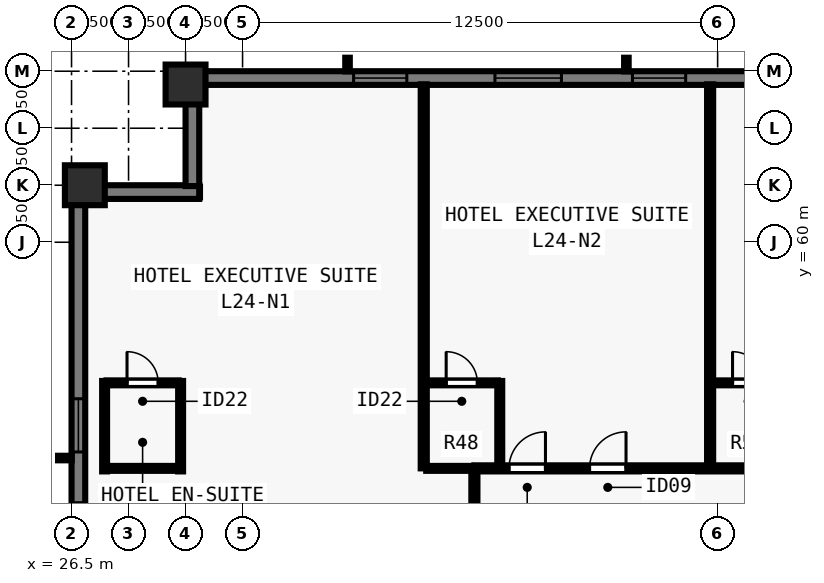
"""IFC4 building model, lengths in metres.
Left out: names, types, materials, properties, quantities, classifications, styles, units other than length and angle.
Written with IfcOpenShell. Run it as: python <this file> out.ifc"""

import sys

from ifc_helpers import new_model, si_unit, direction, frame, frame_2d, origin, origin_2d, place, context, subcontext, project, spatial, rectangle, extrude, element, fill, save


model = new_model("IFC4")
c1 = context("Model", 3, precision=1e-05, world=origin(), true_north=direction((0.0, 1.0)))
c2 = subcontext(c1, "Body", "Model", "MODEL_VIEW")
j1 = project(units=[si_unit("LENGTHUNIT", "METRE"), si_unit("PLANEANGLEUNIT", "RADIAN")], contexts=[c1])
p1 = place(None, origin())
s1 = spatial("IfcSite", under=j1, at=p1, CompositionType="ELEMENT")
p2 = place(p1, origin())
s2 = spatial("IfcBuilding", under=s1, at=p2, CompositionType="ELEMENT")
p3 = place(p2, frame((0.0, 0.0, 90.0)))
s3 = spatial("IfcBuildingStorey", under=s2, at=p3, CompositionType="ELEMENT", Elevation=90.0)
for number, where, z_axis, x_axis in (
    (1, (29.5, 64.15, 0.0), (0.0, 0.0, 1.0), (1.0, 0.0, 0.0)),
    (2, (26.85, 61.5, 0.0), (0.0, 0.0, 1.0), (0.0, 1.0, 0.0)),
):
    element("IfcColumn", number, at=place(p3, frame(where, z_axis=z_axis, x_axis=x_axis)), inside=s3, PredefinedType="COLUMN", context=c2, shape_type="SweptSolid", body=[
        extrude(rectangle(XDim=1.05, YDim=1.05, at=origin_2d()), origin(), (0.0, 0.0, 1.0), 3.5),
    ])
p4 = place(p3, frame((26.68, 16.5, 0.0), z_axis=(0.0, 0.0, 1.0), x_axis=(0.0, 1.0, 0.0)))
e3 = element("IfcWall", 3, at=p4, inside=s3, PredefinedType="SOLIDWALL", context=c2, shape_type="SweptSolid", body=[
    extrude(rectangle(XDim=44.662, YDim=0.36, at=frame_2d((22.331, 0.0))), origin(), (0.0, 0.0, 1.0), 3.28),
])
p5 = place(p4, frame((5.68, 0.0, 0.8)))
e4 = element("IfcOpeningElement", 4, at=p5, cuts=e3, PredefinedType="OPENING", context=c2, shape_type="SweptSolid", body=[
    extrude(rectangle(XDim=1.4, YDim=1.544, at=frame_2d((0.7, 0.772))), frame((0.0, 0.19, 0.0), z_axis=(0.0, -1.0, 0.0), x_axis=(1.0, 0.0, 0.0)), (0.0, 0.0, 1.0), 0.38),
])
p6 = place(p4, frame((8.015, 0.0, 0.8)))
e5 = element("IfcOpeningElement", 5, at=p6, cuts=e3, PredefinedType="OPENING", context=c2, shape_type="SweptSolid", body=[
    extrude(rectangle(XDim=1.75, YDim=1.544, at=frame_2d((0.875, 0.772))), frame((0.0, 0.19, 0.0), z_axis=(0.0, -1.0, 0.0), x_axis=(1.0, 0.0, 0.0)), (0.0, 0.0, 1.0), 0.38),
])
p7 = place(p4, frame((11.551, 0.0, 0.8)))
e6 = element("IfcOpeningElement", 6, at=p7, cuts=e3, PredefinedType="OPENING", context=c2, shape_type="SweptSolid", body=[
    extrude(rectangle(XDim=1.4, YDim=1.544, at=frame_2d((0.7, 0.772))), frame((0.0, 0.19, 0.0), z_axis=(0.0, -1.0, 0.0), x_axis=(1.0, 0.0, 0.0)), (0.0, 0.0, 1.0), 0.38),
])
p8 = place(p4, frame((14.736, 0.0, 0.8)))
e7 = element("IfcOpeningElement", 7, at=p8, cuts=e3, PredefinedType="OPENING", context=c2, shape_type="SweptSolid", body=[
    extrude(rectangle(XDim=1.75, YDim=1.544, at=frame_2d((0.875, 0.772))), frame((0.0, 0.19, 0.0), z_axis=(0.0, -1.0, 0.0), x_axis=(1.0, 0.0, 0.0)), (0.0, 0.0, 1.0), 0.38),
])
p9 = place(p4, frame((18.721, 0.0, 0.8)))
e8 = element("IfcOpeningElement", 8, at=p9, cuts=e3, PredefinedType="OPENING", context=c2, shape_type="SweptSolid", body=[
    extrude(rectangle(XDim=1.4, YDim=1.544, at=frame_2d((0.7, 0.772))), frame((0.0, 0.19, 0.0), z_axis=(0.0, -1.0, 0.0), x_axis=(1.0, 0.0, 0.0)), (0.0, 0.0, 1.0), 0.38),
])
p10 = place(p4, frame((22.706, 0.0, 0.8)))
e9 = element("IfcOpeningElement", 9, at=p10, cuts=e3, PredefinedType="OPENING", context=c2, shape_type="SweptSolid", body=[
    extrude(rectangle(XDim=1.75, YDim=1.544, at=frame_2d((0.875, 0.772))), frame((0.0, 0.19, 0.0), z_axis=(0.0, -1.0, 0.0), x_axis=(1.0, 0.0, 0.0)), (0.0, 0.0, 1.0), 0.38),
])
p11 = place(p4, frame((24.991, 0.0, 0.8)))
e10 = element("IfcOpeningElement", 10, at=p11, cuts=e3, PredefinedType="OPENING", context=c2, shape_type="SweptSolid", body=[
    extrude(rectangle(XDim=1.4, YDim=1.544, at=frame_2d((0.7, 0.772))), frame((0.0, 0.19, 0.0), z_axis=(0.0, -1.0, 0.0), x_axis=(1.0, 0.0, 0.0)), (0.0, 0.0, 1.0), 0.38),
])
p12 = place(p4, frame((28.177, 0.0, 0.8)))
e11 = element("IfcOpeningElement", 11, at=p12, cuts=e3, PredefinedType="OPENING", context=c2, shape_type="SweptSolid", body=[
    extrude(rectangle(XDim=1.75, YDim=1.544, at=frame_2d((0.875, 0.772))), frame((0.0, 0.19, 0.0), z_axis=(0.0, -1.0, 0.0), x_axis=(1.0, 0.0, 0.0)), (0.0, 0.0, 1.0), 0.38),
])
p13 = place(p4, frame((31.711, 0.0, 0.8)))
e12 = element("IfcOpeningElement", 12, at=p13, cuts=e3, PredefinedType="OPENING", context=c2, shape_type="SweptSolid", body=[
    extrude(rectangle(XDim=1.4, YDim=1.544, at=frame_2d((0.7, 0.772))), frame((0.0, 0.19, 0.0), z_axis=(0.0, -1.0, 0.0), x_axis=(1.0, 0.0, 0.0)), (0.0, 0.0, 1.0), 0.38),
])
p14 = place(p4, frame((34.897, 0.0, 0.8)))
e13 = element("IfcOpeningElement", 13, at=p14, cuts=e3, PredefinedType="OPENING", context=c2, shape_type="SweptSolid", body=[
    extrude(rectangle(XDim=1.75, YDim=1.544, at=frame_2d((0.875, 0.772))), frame((0.0, 0.19, 0.0), z_axis=(0.0, -1.0, 0.0), x_axis=(1.0, 0.0, 0.0)), (0.0, 0.0, 1.0), 0.38),
])
p15 = place(p4, frame((37.982, 0.0, 0.8)))
e14 = element("IfcOpeningElement", 14, at=p15, cuts=e3, PredefinedType="OPENING", context=c2, shape_type="SweptSolid", body=[
    extrude(rectangle(XDim=1.4, YDim=1.544, at=frame_2d((0.7, 0.772))), frame((0.0, 0.19, 0.0), z_axis=(0.0, -1.0, 0.0), x_axis=(1.0, 0.0, 0.0)), (0.0, 0.0, 1.0), 0.38),
])
p16 = place(p3, frame((26.5, 61.32, 0.0), z_axis=(0.0, 0.0, 1.0), x_axis=(1.0, 0.0, 0.0)))
e15 = element("IfcWall", 15, at=p16, inside=s3, PredefinedType="SOLIDWALL", context=c2, shape_type="SweptSolid", body=[
    extrude(rectangle(XDim=3.36, YDim=0.36, at=frame_2d((1.68, 0.0))), origin(), (0.0, 0.0, 1.0), 3.28),
])
p17 = place(p3, frame((29.68, 61.478, 0.0), z_axis=(0.0, 0.0, 1.0), x_axis=(0.0, 1.0, 0.0)))
e16 = element("IfcWall", 16, at=p17, inside=s3, PredefinedType="SOLIDWALL", context=c2, shape_type="SweptSolid", body=[
    extrude(rectangle(XDim=2.684, YDim=0.36, at=frame_2d((1.342, 0.0))), origin(), (0.0, 0.0, 1.0), 3.28),
])
p18 = place(p3, frame((29.5, 64.32, 0.0), z_axis=(0.0, 0.0, 1.0), x_axis=(1.0, 0.0, 0.0)))
e17 = element("IfcWall", 17, at=p18, inside=s3, PredefinedType="SOLIDWALL", context=c2, shape_type="SweptSolid", body=[
    extrude(rectangle(XDim=28.362, YDim=0.36, at=frame_2d((14.181, 0.0))), origin(), (0.0, 0.0, 1.0), 3.28),
])
p19 = place(p18, frame((4.422, 0.0, 0.8)))
e18 = element("IfcOpeningElement", 18, at=p19, cuts=e17, PredefinedType="OPENING", context=c2, shape_type="SweptSolid", body=[
    extrude(rectangle(XDim=1.4, YDim=1.544, at=frame_2d((0.7, 0.772))), frame((0.0, 0.19, 0.0), z_axis=(0.0, -1.0, 0.0), x_axis=(1.0, 0.0, 0.0)), (0.0, 0.0, 1.0), 0.38),
])
p20 = place(p18, frame((8.14, 0.0, 0.8)))
e19 = element("IfcOpeningElement", 19, at=p20, cuts=e17, PredefinedType="OPENING", context=c2, shape_type="SweptSolid", body=[
    extrude(rectangle(XDim=1.75, YDim=1.544, at=frame_2d((0.875, 0.772))), frame((0.0, 0.19, 0.0), z_axis=(0.0, -1.0, 0.0), x_axis=(1.0, 0.0, 0.0)), (0.0, 0.0, 1.0), 0.38),
])
p21 = place(p18, frame((11.759, 0.0, 0.8)))
e20 = element("IfcOpeningElement", 20, at=p21, cuts=e17, PredefinedType="OPENING", context=c2, shape_type="SweptSolid", body=[
    extrude(rectangle(XDim=1.4, YDim=1.544, at=frame_2d((0.7, 0.772))), frame((0.0, 0.19, 0.0), z_axis=(0.0, -1.0, 0.0), x_axis=(1.0, 0.0, 0.0)), (0.0, 0.0, 1.0), 0.38),
])
p22 = place(p18, frame((15.028, 0.0, 0.8)))
e21 = element("IfcOpeningElement", 21, at=p22, cuts=e17, PredefinedType="OPENING", context=c2, shape_type="SweptSolid", body=[
    extrude(rectangle(XDim=1.75, YDim=1.544, at=frame_2d((0.875, 0.772))), frame((0.0, 0.19, 0.0), z_axis=(0.0, -1.0, 0.0), x_axis=(1.0, 0.0, 0.0)), (0.0, 0.0, 1.0), 0.38),
])
p23 = place(p18, frame((18.646, 0.0, 0.8)))
e22 = element("IfcOpeningElement", 22, at=p23, cuts=e17, PredefinedType="OPENING", context=c2, shape_type="SweptSolid", body=[
    extrude(rectangle(XDim=1.4, YDim=1.544, at=frame_2d((0.7, 0.772))), frame((0.0, 0.19, 0.0), z_axis=(0.0, -1.0, 0.0), x_axis=(1.0, 0.0, 0.0)), (0.0, 0.0, 1.0), 0.38),
])
p24 = place(p18, frame((20.665, 0.0, 0.8)))
e23 = element("IfcOpeningElement", 23, at=p24, cuts=e17, PredefinedType="OPENING", context=c2, shape_type="SweptSolid", body=[
    extrude(rectangle(XDim=1.75, YDim=1.544, at=frame_2d((0.875, 0.772))), frame((0.0, 0.19, 0.0), z_axis=(0.0, -1.0, 0.0), x_axis=(1.0, 0.0, 0.0)), (0.0, 0.0, 1.0), 0.38),
])
p25 = place(p18, frame((23.35, 0.0, 0.8)))
e24 = element("IfcOpeningElement", 24, at=p25, cuts=e17, PredefinedType="OPENING", context=c2, shape_type="SweptSolid", body=[
    extrude(rectangle(XDim=0.9, YDim=1.544, at=frame_2d((0.45, 0.772))), frame((0.0, 0.19, 0.0), z_axis=(0.0, -1.0, 0.0), x_axis=(1.0, 0.0, 0.0)), (0.0, 0.0, 1.0), 0.38),
])
p26 = place(p3, frame((37.1, 54.05, 0.0), z_axis=(0.0, 0.0, 1.0), x_axis=(1.0, 0.0, 0.0)))
e25 = element("IfcWall", 25, at=p26, inside=s3, PredefinedType="PARTITIONING", context=c2, shape_type="SweptSolid", body=[
    extrude(rectangle(XDim=29.8, YDim=0.16, at=frame_2d((14.9, 0.0))), origin(), (0.0, 0.0, 1.0), 3.28),
])
p27 = place(p26, frame((0.91, 0.0, 0.0)))
e26 = element("IfcOpeningElement", 26, at=p27, cuts=e25, PredefinedType="OPENING", context=c2, shape_type="SweptSolid", body=[
    extrude(rectangle(XDim=0.96, YDim=2.15, at=frame_2d((0.48, 1.075))), frame((0.0, 0.09, 0.0), z_axis=(0.0, -1.0, 0.0), x_axis=(1.0, 0.0, 0.0)), (0.0, 0.0, 1.0), 0.18),
])
p28 = place(p26, frame((3.03, 0.0, 0.0)))
e27 = element("IfcOpeningElement", 27, at=p28, cuts=e25, PredefinedType="OPENING", context=c2, shape_type="SweptSolid", body=[
    extrude(rectangle(XDim=0.96, YDim=2.15, at=frame_2d((0.48, 1.075))), frame((0.0, 0.09, 0.0), z_axis=(0.0, -1.0, 0.0), x_axis=(1.0, 0.0, 0.0)), (0.0, 0.0, 1.0), 0.18),
])
p29 = place(p26, frame((11.39, 0.0, 0.0)))
e28 = element("IfcOpeningElement", 28, at=p29, cuts=e25, PredefinedType="OPENING", context=c2, shape_type="SweptSolid", body=[
    extrude(rectangle(XDim=0.96, YDim=2.15, at=frame_2d((0.48, 1.075))), frame((0.0, 0.09, 0.0), z_axis=(0.0, -1.0, 0.0), x_axis=(1.0, 0.0, 0.0)), (0.0, 0.0, 1.0), 0.18),
])
p30 = place(p26, frame((19.75, 0.0, 0.0)))
e29 = element("IfcOpeningElement", 29, at=p30, cuts=e25, PredefinedType="OPENING", context=c2, shape_type="SweptSolid", body=[
    extrude(rectangle(XDim=0.96, YDim=2.15, at=frame_2d((0.48, 1.075))), frame((0.0, 0.09, 0.0), z_axis=(0.0, -1.0, 0.0), x_axis=(1.0, 0.0, 0.0)), (0.0, 0.0, 1.0), 0.18),
])
p31 = place(p26, frame((26.931, 0.0, 0.0)))
e30 = element("IfcOpeningElement", 30, at=p31, cuts=e25, PredefinedType="OPENING", context=c2, shape_type="SweptSolid", body=[
    extrude(rectangle(XDim=0.96, YDim=2.15, at=frame_2d((0.48, 1.075))), frame((0.0, 0.09, 0.0), z_axis=(0.0, -1.0, 0.0), x_axis=(1.0, 0.0, 0.0)), (0.0, 0.0, 1.0), 0.18),
])
p32 = place(p26, frame((28.48, 0.0, 0.0)))
e31 = element("IfcOpeningElement", 31, at=p32, cuts=e25, PredefinedType="OPENING", context=c2, shape_type="SweptSolid", body=[
    extrude(rectangle(XDim=0.96, YDim=2.15, at=frame_2d((0.48, 1.075))), frame((0.0, 0.09, 0.0), z_axis=(0.0, -1.0, 0.0), x_axis=(1.0, 0.0, 0.0)), (0.0, 0.0, 1.0), 0.18),
])
p33 = place(p3, frame((37.1, 24.015, 0.0), z_axis=(0.0, 0.0, 1.0), x_axis=(0.0, 1.0, 0.0)))
e32 = element("IfcWall", 32, at=p33, inside=s3, PredefinedType="PARTITIONING", context=c2, shape_type="SweptSolid", body=[
    extrude(rectangle(XDim=29.97, YDim=0.16, at=frame_2d((14.985, 0.0))), origin(), (0.0, 0.0, 1.0), 3.28),
])
p34 = place(p33, frame((8.134, 0.0, 0.0)))
e33 = element("IfcOpeningElement", 33, at=p34, cuts=e32, PredefinedType="OPENING", context=c2, shape_type="SweptSolid", body=[
    extrude(rectangle(XDim=0.96, YDim=2.15, at=frame_2d((0.48, 1.075))), frame((0.0, 0.09, 0.0), z_axis=(0.0, -1.0, 0.0), x_axis=(1.0, 0.0, 0.0)), (0.0, 0.0, 1.0), 0.18),
])
p35 = place(p33, frame((22.934, 0.0, 0.0)))
e34 = element("IfcOpeningElement", 34, at=p35, cuts=e32, PredefinedType="OPENING", context=c2, shape_type="SweptSolid", body=[
    extrude(rectangle(XDim=0.96, YDim=2.15, at=frame_2d((0.48, 1.075))), frame((0.0, 0.09, 0.0), z_axis=(0.0, -1.0, 0.0), x_axis=(1.0, 0.0, 0.0)), (0.0, 0.0, 1.0), 0.18),
])
for number, where, z_axis, x_axis in (
    (35, (27.37, 53.97, 0.0), (0.0, 0.0, 1.0), (0.0, 1.0, 0.0)),
    (36, (29.37, 53.97, 0.0), (0.0, 0.0, 1.0), (0.0, 1.0, 0.0)),
):
    element("IfcWall", number, at=place(p3, frame(where, z_axis=z_axis, x_axis=x_axis)), inside=s3, PredefinedType="PLUMBINGWALL", context=c2, shape_type="SweptSolid", body=[
        extrude(rectangle(XDim=2.38, YDim=0.13, at=frame_2d((1.19, 0.0))), origin(), (0.0, 0.0, 1.0), 3.28),
    ])
p36 = place(p3, frame((27.42, 56.3, 0.0), z_axis=(0.0, 0.0, 1.0), x_axis=(1.0, 0.0, 0.0)))
e37 = element("IfcWall", 37, at=p36, inside=s3, PredefinedType="PLUMBINGWALL", context=c2, shape_type="SweptSolid", body=[
    extrude(rectangle(XDim=1.9, YDim=0.13, at=frame_2d((0.95, 0.0))), origin(), (0.0, 0.0, 1.0), 3.28),
])
p37 = place(p36, frame((0.54, 0.0, 0.0)))
e38 = element("IfcOpeningElement", 38, at=p37, cuts=e37, PredefinedType="OPENING", context=c2, shape_type="SweptSolid", body=[
    extrude(rectangle(XDim=0.82, YDim=2.1, at=frame_2d((0.41, 1.05))), frame((0.0, 0.075, 0.0), z_axis=(0.0, -1.0, 0.0), x_axis=(1.0, 0.0, 0.0)), (0.0, 0.0, 1.0), 0.15),
])
p38 = place(p3, frame((27.42, 54.05, 0.0), z_axis=(0.0, 0.0, 1.0), x_axis=(1.0, 0.0, 0.0)))
e39 = element("IfcWall", 39, at=p38, inside=s3, PredefinedType="PLUMBINGWALL", context=c2, shape_type="SweptSolid", body=[
    extrude(rectangle(XDim=1.9, YDim=0.13, at=frame_2d((0.95, 0.0))), origin(), (0.0, 0.0, 1.0), 3.28),
])
p39 = place(p3, frame((35.768, 54.05, 0.0), z_axis=(0.0, 0.0, 1.0), x_axis=(0.0, 1.0, 0.0)))
e40 = element("IfcWall", 40, at=p39, inside=s3, PredefinedType="PARTITIONING", context=c2, shape_type="SweptSolid", body=[
    extrude(rectangle(XDim=10.105, YDim=0.16, at=frame_2d((5.052, 0.0))), origin(), (0.0, 0.0, 1.0), 2.439),
])
p40 = place(p3, frame((37.768, 54.115, 0.0), z_axis=(0.0, 0.0, 1.0), x_axis=(0.0, 1.0, 0.0)))
e41 = element("IfcWall", 41, at=p40, inside=s3, PredefinedType="PLUMBINGWALL", context=c2, shape_type="SweptSolid", body=[
    extrude(rectangle(XDim=2.235, YDim=0.13, at=frame_2d((1.118, 0.0))), origin(), (0.0, 0.0, 1.0), 2.439),
])
p41 = place(p3, frame((35.833, 56.3, 0.0), z_axis=(0.0, 0.0, 1.0), x_axis=(1.0, 0.0, 0.0)))
e42 = element("IfcWall", 42, at=p41, inside=s3, PredefinedType="PLUMBINGWALL", context=c2, shape_type="SweptSolid", body=[
    extrude(rectangle(XDim=1.885, YDim=0.13, at=frame_2d((0.942, 0.0))), origin(), (0.0, 0.0, 1.0), 3.28),
])
p42 = place(p41, frame((0.525, 0.0, 0.0)))
e43 = element("IfcOpeningElement", 43, at=p42, cuts=e42, PredefinedType="OPENING", context=c2, shape_type="SweptSolid", body=[
    extrude(rectangle(XDim=0.82, YDim=2.1, at=frame_2d((0.41, 1.05))), frame((0.0, 0.075, 0.0), z_axis=(0.0, -1.0, 0.0), x_axis=(1.0, 0.0, 0.0)), (0.0, 0.0, 1.0), 0.15),
])
p43 = place(p3, frame((35.833, 54.05, 0.0), z_axis=(0.0, 0.0, 1.0), x_axis=(1.0, 0.0, 0.0)))
e44 = element("IfcWall", 44, at=p43, inside=s3, PredefinedType="PLUMBINGWALL", context=c2, shape_type="SweptSolid", body=[
    extrude(rectangle(XDim=1.188, YDim=0.13, at=frame_2d((0.594, 0.0))), origin(), (0.0, 0.0, 1.0), 3.28),
])
p44 = place(p3, frame((43.302, 54.115, 0.0), z_axis=(0.0, 0.0, 1.0), x_axis=(0.0, 1.0, 0.0)))
e45 = element("IfcWall", 45, at=p44, inside=s3, PredefinedType="PARTITIONING", context=c2, shape_type="SweptSolid", body=[
    extrude(rectangle(XDim=10.04, YDim=0.16, at=frame_2d((5.02, 0.0))), origin(), (0.0, 0.0, 1.0), 3.28),
])
p45 = place(p3, frame((43.367, 56.3, 0.0), z_axis=(0.0, 0.0, 1.0), x_axis=(1.0, 0.0, 0.0)))
e46 = element("IfcWall", 46, at=p45, inside=s3, PredefinedType="PLUMBINGWALL", context=c2, shape_type="SweptSolid", body=[
    extrude(rectangle(XDim=1.885, YDim=0.13, at=frame_2d((0.942, 0.0))), origin(), (0.0, 0.0, 1.0), 3.28),
])
p46 = place(p45, frame((0.525, 0.0, 0.0)))
e47 = element("IfcOpeningElement", 47, at=p46, cuts=e46, PredefinedType="OPENING", context=c2, shape_type="SweptSolid", body=[
    extrude(rectangle(XDim=0.82, YDim=2.1, at=frame_2d((0.41, 1.05))), frame((0.0, 0.075, 0.0), z_axis=(0.0, -1.0, 0.0), x_axis=(1.0, 0.0, 0.0)), (0.0, 0.0, 1.0), 0.15),
])
p47 = place(p14, origin())
e48 = element("IfcWindow", 48, at=p47, inside=s3, PartitioningType="SINGLE_PANEL", PredefinedType="WINDOW", context=c2, shape_type="SweptSolid", body=[
    extrude(rectangle(XDim=1.75, YDim=1.544, at=frame_2d((0.875, 0.772))), frame((0.0, -0.05, 0.0), z_axis=(0.0, -1.0, 0.0), x_axis=(1.0, 0.0, 0.0)), (0.0, 0.0, 1.0), 0.06),
])
fill(e13, e48)
p48 = place(p15, origin())
e49 = element("IfcWindow", 49, at=p48, inside=s3, PartitioningType="SINGLE_PANEL", PredefinedType="WINDOW", context=c2, shape_type="SweptSolid", body=[
    extrude(rectangle(XDim=1.4, YDim=1.544, at=frame_2d((0.7, 0.772))), frame((0.0, -0.05, 0.0), z_axis=(0.0, -1.0, 0.0), x_axis=(1.0, 0.0, 0.0)), (0.0, 0.0, 1.0), 0.06),
])
fill(e14, e49)
p49 = place(p19, origin())
e50 = element("IfcWindow", 50, at=p49, inside=s3, PartitioningType="SINGLE_PANEL", PredefinedType="WINDOW", context=c2, shape_type="SweptSolid", body=[
    extrude(rectangle(XDim=1.4, YDim=1.544, at=frame_2d((0.7, 0.772))), frame((0.0, -0.05, 0.0), z_axis=(0.0, -1.0, 0.0), x_axis=(1.0, 0.0, 0.0)), (0.0, 0.0, 1.0), 0.06),
])
fill(e18, e50)
p50 = place(p20, origin())
e51 = element("IfcWindow", 51, at=p50, inside=s3, PartitioningType="SINGLE_PANEL", PredefinedType="WINDOW", context=c2, shape_type="SweptSolid", body=[
    extrude(rectangle(XDim=1.75, YDim=1.544, at=frame_2d((0.875, 0.772))), frame((0.0, -0.05, 0.0), z_axis=(0.0, -1.0, 0.0), x_axis=(1.0, 0.0, 0.0)), (0.0, 0.0, 1.0), 0.06),
])
fill(e19, e51)
p51 = place(p21, origin())
e52 = element("IfcWindow", 52, at=p51, inside=s3, PartitioningType="SINGLE_PANEL", PredefinedType="WINDOW", context=c2, shape_type="SweptSolid", body=[
    extrude(rectangle(XDim=1.4, YDim=1.544, at=frame_2d((0.7, 0.772))), frame((0.0, -0.05, 0.0), z_axis=(0.0, -1.0, 0.0), x_axis=(1.0, 0.0, 0.0)), (0.0, 0.0, 1.0), 0.06),
])
fill(e20, e52)
p52 = place(p37, origin())
e53 = element("IfcDoor", 53, at=p52, inside=s3, OperationType="SINGLE_SWING_LEFT", PredefinedType="DOOR", context=c2, shape_type="SweptSolid", body=[
    extrude(rectangle(XDim=0.82, YDim=2.1, at=frame_2d((0.41, 1.05))), frame((0.0, 0.025, 0.0), z_axis=(0.0, -1.0, 0.0), x_axis=(1.0, 0.0, 0.0)), (0.0, 0.0, 1.0), 0.05),
])
fill(e38, e53)
p53 = place(p27, origin())
e54 = element("IfcDoor", 54, at=p53, inside=s3, OperationType="SINGLE_SWING_RIGHT", PredefinedType="DOOR", context=c2, shape_type="SweptSolid", body=[
    extrude(rectangle(XDim=0.96, YDim=2.15, at=frame_2d((0.48, 1.075))), frame((0.0, 0.025, 0.0), z_axis=(0.0, -1.0, 0.0), x_axis=(1.0, 0.0, 0.0)), (0.0, 0.0, 1.0), 0.05),
])
fill(e26, e54)
p54 = place(p42, origin())
e55 = element("IfcDoor", 55, at=p54, inside=s3, OperationType="SINGLE_SWING_LEFT", PredefinedType="DOOR", context=c2, shape_type="SweptSolid", body=[
    extrude(rectangle(XDim=0.82, YDim=2.1, at=frame_2d((0.41, 1.05))), frame((0.0, 0.025, 0.0), z_axis=(0.0, -1.0, 0.0), x_axis=(1.0, 0.0, 0.0)), (0.0, 0.0, 1.0), 0.05),
])
fill(e43, e55)
p55 = place(p28, origin())
e56 = element("IfcDoor", 56, at=p55, inside=s3, OperationType="SINGLE_SWING_RIGHT", PredefinedType="DOOR", context=c2, shape_type="SweptSolid", body=[
    extrude(rectangle(XDim=0.96, YDim=2.15, at=frame_2d((0.48, 1.075))), frame((0.0, 0.025, 0.0), z_axis=(0.0, -1.0, 0.0), x_axis=(1.0, 0.0, 0.0)), (0.0, 0.0, 1.0), 0.05),
])
fill(e27, e56)
p56 = place(p46, origin())
e57 = element("IfcDoor", 57, at=p56, inside=s3, OperationType="SINGLE_SWING_LEFT", PredefinedType="DOOR", context=c2, shape_type="SweptSolid", body=[
    extrude(rectangle(XDim=0.82, YDim=2.1, at=frame_2d((0.41, 1.05))), frame((0.0, 0.025, 0.0), z_axis=(0.0, -1.0, 0.0), x_axis=(1.0, 0.0, 0.0)), (0.0, 0.0, 1.0), 0.05),
])
fill(e47, e57)
save(model, sys.argv[1])
